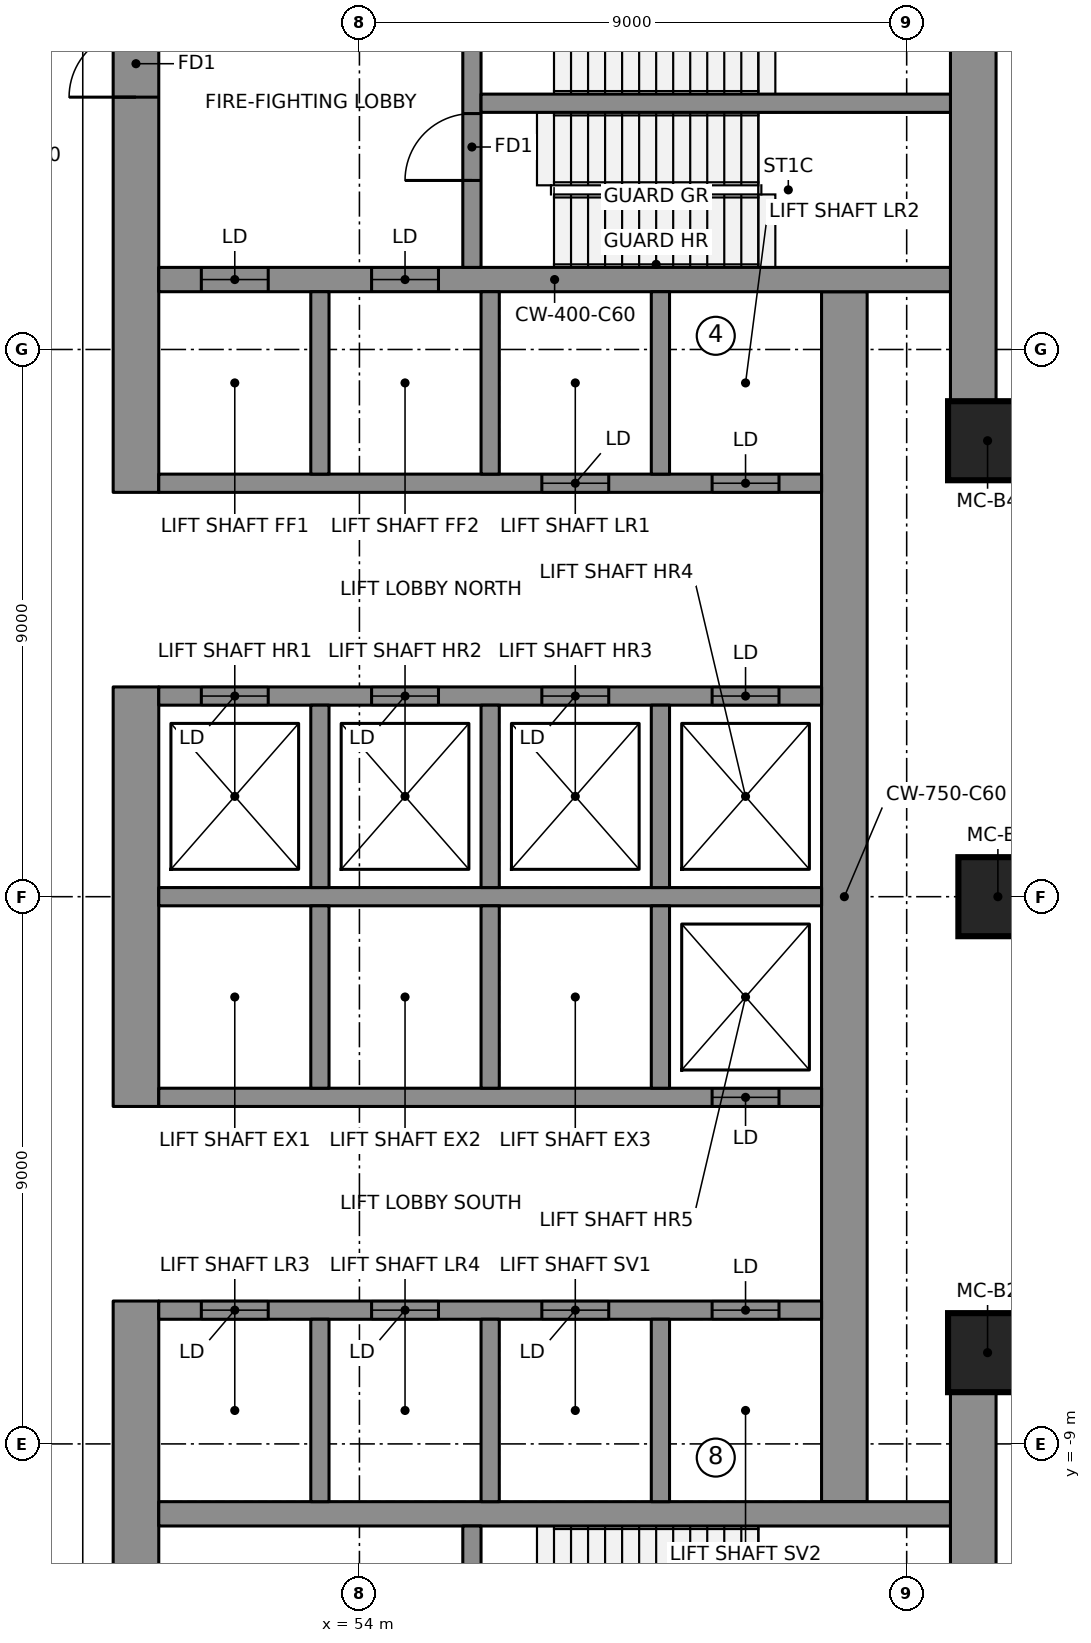
"""IFC4 building model, lengths in metres.
Left out: names, types, materials, properties, quantities, classifications, styles, units other than length and angle.
Written with IfcOpenShell. Run it as: python <this file> out.ifc"""

import sys

from ifc_helpers import new_model, si_unit, direction, frame, frame_2d, origin, origin_2d, place, context, subcontext, project, spatial, rectangle, extrude, element, fill, save


model = new_model("IFC4")
c1 = context("Model", 3, precision=1e-05, world=origin(), true_north=direction((0.0, 1.0)))
c2 = subcontext(c1, "Body", "Model", "MODEL_VIEW")
j1 = project(units=[si_unit("LENGTHUNIT", "METRE"), si_unit("PLANEANGLEUNIT", "RADIAN")], contexts=[c1])
p1 = place(None, origin())
s1 = spatial("IfcSite", under=j1, at=p1, CompositionType="ELEMENT")
p2 = place(p1, origin())
s2 = spatial("IfcBuilding", under=s1, at=p2, CompositionType="ELEMENT")
p3 = place(p2, frame((0.0, 0.0, 170.9)))
s3 = spatial("IfcBuildingStorey", under=s2, at=p3, CompositionType="ELEMENT", Elevation=170.9)
p4 = place(p3, frame((50.325, 6.65, 0.0), z_axis=(0.0, 0.0, 1.0), x_axis=(0.0, 1.0, 0.0)))
e1 = element("IfcWall", 1, at=p4, inside=s3, PredefinedType="SHEAR", context=c2, shape_type="SweptSolid", body=[
    extrude(rectangle(XDim=9.85, YDim=0.75, at=frame_2d((4.925, 0.0))), origin(), (0.0, 0.0, 1.0), 4.6),
])
p5 = place(p4, frame((6.5, 0.0, 0.0)))
e2 = element("IfcOpeningElement", 2, at=p5, cuts=e1, PredefinedType="OPENING", context=c2, shape_type="SweptSolid", body=[
    extrude(rectangle(XDim=1.1, YDim=2.1, at=frame_2d((0.55, 1.05))), frame((0.0, 0.385, 0.0), z_axis=(0.0, -1.0, 0.0), x_axis=(1.0, 0.0, 0.0)), (0.0, 0.0, 1.0), 0.77),
])
p6 = place(p3, frame((50.325, -3.45, 0.0), z_axis=(0.0, 0.0, 1.0), x_axis=(0.0, 1.0, 0.0)))
e3 = element("IfcWall", 3, at=p6, inside=s3, PredefinedType="SHEAR", context=c2, shape_type="SweptSolid", body=[
    extrude(rectangle(XDim=6.9, YDim=0.75, at=frame_2d((3.45, 0.0))), origin(), (0.0, 0.0, 1.0), 4.6),
])
p7 = place(p3, frame((50.325, -16.5, 0.0), z_axis=(0.0, 0.0, 1.0), x_axis=(0.0, 1.0, 0.0)))
e4 = element("IfcWall", 4, at=p7, inside=s3, PredefinedType="SHEAR", context=c2, shape_type="SweptSolid", body=[
    extrude(rectangle(XDim=9.85, YDim=0.75, at=frame_2d((4.925, 0.0))), origin(), (0.0, 0.0, 1.0), 4.6),
])
p8 = place(p7, frame((2.25, 0.0, 0.0)))
e5 = element("IfcOpeningElement", 5, at=p8, cuts=e4, PredefinedType="OPENING", context=c2, shape_type="SweptSolid", body=[
    extrude(rectangle(XDim=1.1, YDim=2.1, at=frame_2d((0.55, 1.05))), frame((0.0, 0.385, 0.0), z_axis=(0.0, -1.0, 0.0), x_axis=(1.0, 0.0, 0.0)), (0.0, 0.0, 1.0), 0.77),
])
for number, where, z_axis, x_axis in (
    (6, (64.095, 8.099, 0.0), (0.0, 0.0, 1.0), (0.0, 1.0, 0.0)),
    (7, (64.095, -15.75, 0.0), (0.0, 0.0, 1.0), (0.0, 1.0, 0.0)),
):
    element("IfcWall", number, at=place(p3, frame(where, z_axis=z_axis, x_axis=x_axis)), inside=s3, PredefinedType="SHEAR", context=c2, shape_type="SweptSolid", body=[
        extrude(rectangle(XDim=7.651, YDim=0.75, at=frame_2d((3.825, 0.0))), origin(), (0.0, 0.0, 1.0), 4.6),
    ])
p9 = place(p3, frame((61.975, -9.95, 0.0), z_axis=(0.0, 0.0, 1.0), x_axis=(0.0, 1.0, 0.0)))
e8 = element("IfcWall", 8, at=p9, inside=s3, PredefinedType="SHEAR", context=c2, shape_type="SweptSolid", body=[
    extrude(rectangle(XDim=19.9, YDim=0.75, at=frame_2d((9.95, 0.0))), origin(), (0.0, 0.0, 1.0), 4.6),
])
p10 = place(p3, frame((50.7, 10.15, 0.0), z_axis=(0.0, 0.0, 1.0), x_axis=(1.0, 0.0, 0.0)))
e9 = element("IfcWall", 9, at=p10, inside=s3, PredefinedType="SHEAR", context=c2, shape_type="SweptSolid", body=[
    extrude(rectangle(XDim=13.02, YDim=0.4, at=frame_2d((6.51, 0.0))), origin(), (0.0, 0.0, 1.0), 4.6),
])
p11 = place(p10, frame((0.7, 0.0, 0.0)))
e10 = element("IfcOpeningElement", 10, at=p11, cuts=e9, PredefinedType="OPENING", context=c2, shape_type="SweptSolid", body=[
    extrude(rectangle(XDim=1.1, YDim=2.1, at=frame_2d((0.55, 1.05))), frame((0.0, 0.21, 0.0), z_axis=(0.0, -1.0, 0.0), x_axis=(1.0, 0.0, 0.0)), (0.0, 0.0, 1.0), 0.42),
])
p12 = place(p10, frame((3.5, 0.0, 0.0)))
e11 = element("IfcOpeningElement", 11, at=p12, cuts=e9, PredefinedType="OPENING", context=c2, shape_type="SweptSolid", body=[
    extrude(rectangle(XDim=1.1, YDim=2.1, at=frame_2d((0.55, 1.05))), frame((0.0, 0.21, 0.0), z_axis=(0.0, -1.0, 0.0), x_axis=(1.0, 0.0, 0.0)), (0.0, 0.0, 1.0), 0.42),
])
p13 = place(p3, frame((50.7, -10.15, 0.0), z_axis=(0.0, 0.0, 1.0), x_axis=(1.0, 0.0, 0.0)))
e12 = element("IfcWall", 12, at=p13, inside=s3, PredefinedType="SHEAR", context=c2, shape_type="SweptSolid", body=[
    extrude(rectangle(XDim=13.02, YDim=0.4, at=frame_2d((6.51, 0.0))), origin(), (0.0, 0.0, 1.0), 4.6),
])
p14 = place(p3, frame((50.7, 0.0, 0.0), z_axis=(0.0, 0.0, 1.0), x_axis=(1.0, 0.0, 0.0)))
e13 = element("IfcWall", 13, at=p14, inside=s3, PredefinedType="SHEAR", context=c2, shape_type="SweptSolid", body=[
    extrude(rectangle(XDim=10.9, YDim=0.3, at=frame_2d((5.45, 0.0))), origin(), (0.0, 0.0, 1.0), 4.6),
])
p15 = place(p3, frame((50.7, 3.3, 0.0), z_axis=(0.0, 0.0, 1.0), x_axis=(1.0, 0.0, 0.0)))
e14 = element("IfcWall", 14, at=p15, inside=s3, PredefinedType="SHEAR", context=c2, shape_type="SweptSolid", body=[
    extrude(rectangle(XDim=10.9, YDim=0.3, at=frame_2d((5.45, 0.0))), origin(), (0.0, 0.0, 1.0), 4.6),
])
p16 = place(p15, frame((0.7, 0.0, 0.0)))
e15 = element("IfcOpeningElement", 15, at=p16, cuts=e14, PredefinedType="OPENING", context=c2, shape_type="SweptSolid", body=[
    extrude(rectangle(XDim=1.1, YDim=2.1, at=frame_2d((0.55, 1.05))), frame((0.0, 0.16, 0.0), z_axis=(0.0, -1.0, 0.0), x_axis=(1.0, 0.0, 0.0)), (0.0, 0.0, 1.0), 0.32),
])
p17 = place(p15, frame((3.5, 0.0, 0.0)))
e16 = element("IfcOpeningElement", 16, at=p17, cuts=e14, PredefinedType="OPENING", context=c2, shape_type="SweptSolid", body=[
    extrude(rectangle(XDim=1.1, YDim=2.1, at=frame_2d((0.55, 1.05))), frame((0.0, 0.16, 0.0), z_axis=(0.0, -1.0, 0.0), x_axis=(1.0, 0.0, 0.0)), (0.0, 0.0, 1.0), 0.32),
])
p18 = place(p15, frame((6.3, 0.0, 0.0)))
e17 = element("IfcOpeningElement", 17, at=p18, cuts=e14, PredefinedType="OPENING", context=c2, shape_type="SweptSolid", body=[
    extrude(rectangle(XDim=1.1, YDim=2.1, at=frame_2d((0.55, 1.05))), frame((0.0, 0.16, 0.0), z_axis=(0.0, -1.0, 0.0), x_axis=(1.0, 0.0, 0.0)), (0.0, 0.0, 1.0), 0.32),
])
p19 = place(p15, frame((9.1, 0.0, 0.0)))
e18 = element("IfcOpeningElement", 18, at=p19, cuts=e14, PredefinedType="OPENING", context=c2, shape_type="SweptSolid", body=[
    extrude(rectangle(XDim=1.1, YDim=2.1, at=frame_2d((0.55, 1.05))), frame((0.0, 0.16, 0.0), z_axis=(0.0, -1.0, 0.0), x_axis=(1.0, 0.0, 0.0)), (0.0, 0.0, 1.0), 0.32),
])
p20 = place(p3, frame((50.7, 6.8, 0.0), z_axis=(0.0, 0.0, 1.0), x_axis=(1.0, 0.0, 0.0)))
e19 = element("IfcWall", 19, at=p20, inside=s3, PredefinedType="SHEAR", context=c2, shape_type="SweptSolid", body=[
    extrude(rectangle(XDim=10.9, YDim=0.3, at=frame_2d((5.45, 0.0))), origin(), (0.0, 0.0, 1.0), 4.6),
])
p21 = place(p20, frame((6.3, 0.0, 0.0)))
e20 = element("IfcOpeningElement", 20, at=p21, cuts=e19, PredefinedType="OPENING", context=c2, shape_type="SweptSolid", body=[
    extrude(rectangle(XDim=1.1, YDim=2.1, at=frame_2d((0.55, 1.05))), frame((0.0, 0.16, 0.0), z_axis=(0.0, -1.0, 0.0), x_axis=(1.0, 0.0, 0.0)), (0.0, 0.0, 1.0), 0.32),
])
p22 = place(p20, frame((9.1, 0.0, 0.0)))
e21 = element("IfcOpeningElement", 21, at=p22, cuts=e19, PredefinedType="OPENING", context=c2, shape_type="SweptSolid", body=[
    extrude(rectangle(XDim=1.1, YDim=2.1, at=frame_2d((0.55, 1.05))), frame((0.0, 0.16, 0.0), z_axis=(0.0, -1.0, 0.0), x_axis=(1.0, 0.0, 0.0)), (0.0, 0.0, 1.0), 0.32),
])
for number, where, z_axis, x_axis in (
    (22, (53.35, 0.15, 0.0), (0.0, 0.0, 1.0), (0.0, 1.0, 0.0)),
    (23, (53.35, 6.95, 0.0), (0.0, 0.0, 1.0), (0.0, 1.0, 0.0)),
    (24, (56.15, 0.15, 0.0), (0.0, 0.0, 1.0), (0.0, 1.0, 0.0)),
    (25, (56.15, 6.95, 0.0), (0.0, 0.0, 1.0), (0.0, 1.0, 0.0)),
    (26, (58.95, 0.15, 0.0), (0.0, 0.0, 1.0), (0.0, 1.0, 0.0)),
    (27, (58.95, 6.95, 0.0), (0.0, 0.0, 1.0), (0.0, 1.0, 0.0)),
):
    element("IfcWall", number, at=place(p3, frame(where, z_axis=z_axis, x_axis=x_axis)), inside=s3, PredefinedType="SHEAR", context=c2, shape_type="SweptSolid", body=[
        extrude(rectangle(XDim=3.0, YDim=0.3, at=frame_2d((1.5, 0.0))), origin(), (0.0, 0.0, 1.0), 4.6),
    ])
p23 = place(p3, frame((50.7, -3.3, 0.0), z_axis=(0.0, 0.0, 1.0), x_axis=(1.0, 0.0, 0.0)))
e28 = element("IfcWall", 28, at=p23, inside=s3, PredefinedType="SHEAR", context=c2, shape_type="SweptSolid", body=[
    extrude(rectangle(XDim=10.9, YDim=0.3, at=frame_2d((5.45, 0.0))), origin(), (0.0, 0.0, 1.0), 4.6),
])
p24 = place(p23, frame((9.1, 0.0, 0.0)))
e29 = element("IfcOpeningElement", 29, at=p24, cuts=e28, PredefinedType="OPENING", context=c2, shape_type="SweptSolid", body=[
    extrude(rectangle(XDim=1.1, YDim=2.1, at=frame_2d((0.55, 1.05))), frame((0.0, 0.16, 0.0), z_axis=(0.0, -1.0, 0.0), x_axis=(1.0, 0.0, 0.0)), (0.0, 0.0, 1.0), 0.32),
])
p25 = place(p3, frame((50.7, -6.8, 0.0), z_axis=(0.0, 0.0, 1.0), x_axis=(1.0, 0.0, 0.0)))
e30 = element("IfcWall", 30, at=p25, inside=s3, PredefinedType="SHEAR", context=c2, shape_type="SweptSolid", body=[
    extrude(rectangle(XDim=10.9, YDim=0.3, at=frame_2d((5.45, 0.0))), origin(), (0.0, 0.0, 1.0), 4.6),
])
p26 = place(p25, frame((0.7, 0.0, 0.0)))
e31 = element("IfcOpeningElement", 31, at=p26, cuts=e30, PredefinedType="OPENING", context=c2, shape_type="SweptSolid", body=[
    extrude(rectangle(XDim=1.1, YDim=2.1, at=frame_2d((0.55, 1.05))), frame((0.0, 0.16, 0.0), z_axis=(0.0, -1.0, 0.0), x_axis=(1.0, 0.0, 0.0)), (0.0, 0.0, 1.0), 0.32),
])
p27 = place(p25, frame((3.5, 0.0, 0.0)))
e32 = element("IfcOpeningElement", 32, at=p27, cuts=e30, PredefinedType="OPENING", context=c2, shape_type="SweptSolid", body=[
    extrude(rectangle(XDim=1.1, YDim=2.1, at=frame_2d((0.55, 1.05))), frame((0.0, 0.16, 0.0), z_axis=(0.0, -1.0, 0.0), x_axis=(1.0, 0.0, 0.0)), (0.0, 0.0, 1.0), 0.32),
])
p28 = place(p25, frame((6.3, 0.0, 0.0)))
e33 = element("IfcOpeningElement", 33, at=p28, cuts=e30, PredefinedType="OPENING", context=c2, shape_type="SweptSolid", body=[
    extrude(rectangle(XDim=1.1, YDim=2.1, at=frame_2d((0.55, 1.05))), frame((0.0, 0.16, 0.0), z_axis=(0.0, -1.0, 0.0), x_axis=(1.0, 0.0, 0.0)), (0.0, 0.0, 1.0), 0.32),
])
p29 = place(p25, frame((9.1, 0.0, 0.0)))
e34 = element("IfcOpeningElement", 34, at=p29, cuts=e30, PredefinedType="OPENING", context=c2, shape_type="SweptSolid", body=[
    extrude(rectangle(XDim=1.1, YDim=2.1, at=frame_2d((0.55, 1.05))), frame((0.0, 0.16, 0.0), z_axis=(0.0, -1.0, 0.0), x_axis=(1.0, 0.0, 0.0)), (0.0, 0.0, 1.0), 0.32),
])
for number, where, z_axis, x_axis in (
    (35, (53.35, -3.15, 0.0), (0.0, 0.0, 1.0), (0.0, 1.0, 0.0)),
    (36, (53.35, -9.95, 0.0), (0.0, 0.0, 1.0), (0.0, 1.0, 0.0)),
    (37, (56.15, -3.15, 0.0), (0.0, 0.0, 1.0), (0.0, 1.0, 0.0)),
    (38, (56.15, -9.95, 0.0), (0.0, 0.0, 1.0), (0.0, 1.0, 0.0)),
    (39, (58.95, -3.15, 0.0), (0.0, 0.0, 1.0), (0.0, 1.0, 0.0)),
    (40, (58.95, -9.95, 0.0), (0.0, 0.0, 1.0), (0.0, 1.0, 0.0)),
):
    element("IfcWall", number, at=place(p3, frame(where, z_axis=z_axis, x_axis=x_axis)), inside=s3, PredefinedType="SHEAR", context=c2, shape_type="SweptSolid", body=[
        extrude(rectangle(XDim=3.0, YDim=0.3, at=frame_2d((1.5, 0.0))), origin(), (0.0, 0.0, 1.0), 4.6),
    ])
p30 = place(p3, frame((55.85, 10.35, 0.0), z_axis=(0.0, 0.0, 1.0), x_axis=(0.0, 1.0, 0.0)))
e41 = element("IfcWall", 41, at=p30, inside=s3, PredefinedType="SHEAR", context=c2, shape_type="SweptSolid", body=[
    extrude(rectangle(XDim=5.4, YDim=0.3, at=frame_2d((2.7, 0.0))), origin(), (0.0, 0.0, 1.0), 4.6),
])
p31 = place(p30, frame((1.43, 0.0, 0.0)))
e42 = element("IfcOpeningElement", 42, at=p31, cuts=e41, PredefinedType="OPENING", context=c2, shape_type="SweptSolid", body=[
    extrude(rectangle(XDim=1.1, YDim=2.1, at=frame_2d((0.55, 1.05))), frame((0.0, 0.16, 0.0), z_axis=(0.0, -1.0, 0.0), x_axis=(1.0, 0.0, 0.0)), (0.0, 0.0, 1.0), 0.32),
])
p32 = place(p30, frame((3.6, 0.0, 0.0)))
e43 = element("IfcOpeningElement", 43, at=p32, cuts=e41, PredefinedType="OPENING", context=c2, shape_type="SweptSolid", body=[
    extrude(rectangle(XDim=1.1, YDim=2.1, at=frame_2d((0.55, 1.05))), frame((0.0, 0.16, 0.0), z_axis=(0.0, -1.0, 0.0), x_axis=(1.0, 0.0, 0.0)), (0.0, 0.0, 1.0), 0.32),
])
p33 = place(p3, frame((55.85, -15.75, 0.0), z_axis=(0.0, 0.0, 1.0), x_axis=(0.0, 1.0, 0.0)))
e44 = element("IfcWall", 44, at=p33, inside=s3, PredefinedType="SHEAR", context=c2, shape_type="SweptSolid", body=[
    extrude(rectangle(XDim=5.4, YDim=0.3, at=frame_2d((2.7, 0.0))), origin(), (0.0, 0.0, 1.0), 4.6),
])
p34 = place(p33, frame((3.6, 0.0, 0.0)))
e45 = element("IfcOpeningElement", 45, at=p34, cuts=e44, PredefinedType="OPENING", context=c2, shape_type="SweptSolid", body=[
    extrude(rectangle(XDim=1.1, YDim=2.1, at=frame_2d((0.55, 1.05))), frame((0.0, 0.16, 0.0), z_axis=(0.0, -1.0, 0.0), x_axis=(1.0, 0.0, 0.0)), (0.0, 0.0, 1.0), 0.32),
])
p35 = place(p33, frame((0.8, 0.0, 0.0)))
e46 = element("IfcOpeningElement", 46, at=p35, cuts=e44, PredefinedType="OPENING", context=c2, shape_type="SweptSolid", body=[
    extrude(rectangle(XDim=0.9, YDim=2.1, at=frame_2d((0.45, 1.05))), frame((0.0, 0.16, 0.0), z_axis=(0.0, -1.0, 0.0), x_axis=(1.0, 0.0, 0.0)), (0.0, 0.0, 1.0), 0.32),
])
p36 = place(p3, frame((56.0, 13.05, 0.0), z_axis=(0.0, 0.0, 1.0), x_axis=(1.0, 0.0, 0.0)))
e47 = element("IfcWall", 47, at=p36, inside=s3, PredefinedType="SHEAR", context=c2, shape_type="SweptSolid", body=[
    extrude(rectangle(XDim=7.72, YDim=0.3, at=frame_2d((3.86, 0.0))), origin(), (0.0, 0.0, 1.0), 4.6),
])
for number, where, z_axis, x_axis in (
    (48, (64.33, -7.499, 0.0), (0.0, 0.0, 1.0), (1.0, 0.0, 0.0)),
    (49, (64.5, 0.0, 0.0), (0.0, 0.0, 1.0), (1.0, 0.0, 0.0)),
    (50, (64.33, 7.499, 0.0), (0.0, 0.0, 1.0), (1.0, 0.0, 0.0)),
):
    element("IfcColumn", number, at=place(p3, frame(where, z_axis=z_axis, x_axis=x_axis)), inside=s3, PredefinedType="COLUMN", context=c2, shape_type="SweptSolid", body=[
        extrude(rectangle(XDim=1.3, YDim=1.3, at=origin_2d()), origin(), (0.0, 0.0, 1.0), 4.6),
    ])
p37 = place(p11, origin())
e51 = element("IfcDoor", 51, at=p37, inside=s3, OperationType="DOUBLE_DOOR_SLIDING", PredefinedType="DOOR", context=c2, shape_type="SweptSolid", body=[
    extrude(rectangle(XDim=1.1, YDim=2.1, at=frame_2d((0.55, 1.05))), frame((0.0, 0.025, 0.0), z_axis=(0.0, -1.0, 0.0), x_axis=(1.0, 0.0, 0.0)), (0.0, 0.0, 1.0), 0.05),
])
fill(e10, e51)
p38 = place(p12, origin())
e52 = element("IfcDoor", 52, at=p38, inside=s3, OperationType="DOUBLE_DOOR_SLIDING", PredefinedType="DOOR", context=c2, shape_type="SweptSolid", body=[
    extrude(rectangle(XDim=1.1, YDim=2.1, at=frame_2d((0.55, 1.05))), frame((0.0, 0.025, 0.0), z_axis=(0.0, -1.0, 0.0), x_axis=(1.0, 0.0, 0.0)), (0.0, 0.0, 1.0), 0.05),
])
fill(e11, e52)
p39 = place(p21, origin())
e53 = element("IfcDoor", 53, at=p39, inside=s3, OperationType="DOUBLE_DOOR_SLIDING", PredefinedType="DOOR", context=c2, shape_type="SweptSolid", body=[
    extrude(rectangle(XDim=1.1, YDim=2.1, at=frame_2d((0.55, 1.05))), frame((0.0, 0.025, 0.0), z_axis=(0.0, -1.0, 0.0), x_axis=(1.0, 0.0, 0.0)), (0.0, 0.0, 1.0), 0.05),
])
fill(e20, e53)
p40 = place(p22, origin())
e54 = element("IfcDoor", 54, at=p40, inside=s3, OperationType="DOUBLE_DOOR_SLIDING", PredefinedType="DOOR", context=c2, shape_type="SweptSolid", body=[
    extrude(rectangle(XDim=1.1, YDim=2.1, at=frame_2d((0.55, 1.05))), frame((0.0, 0.025, 0.0), z_axis=(0.0, -1.0, 0.0), x_axis=(1.0, 0.0, 0.0)), (0.0, 0.0, 1.0), 0.05),
])
fill(e21, e54)
p41 = place(p16, origin())
e55 = element("IfcDoor", 55, at=p41, inside=s3, OperationType="DOUBLE_DOOR_SLIDING", PredefinedType="DOOR", context=c2, shape_type="SweptSolid", body=[
    extrude(rectangle(XDim=1.1, YDim=2.1, at=frame_2d((0.55, 1.05))), frame((0.0, 0.025, 0.0), z_axis=(0.0, -1.0, 0.0), x_axis=(1.0, 0.0, 0.0)), (0.0, 0.0, 1.0), 0.05),
])
fill(e15, e55)
p42 = place(p17, origin())
e56 = element("IfcDoor", 56, at=p42, inside=s3, OperationType="DOUBLE_DOOR_SLIDING", PredefinedType="DOOR", context=c2, shape_type="SweptSolid", body=[
    extrude(rectangle(XDim=1.1, YDim=2.1, at=frame_2d((0.55, 1.05))), frame((0.0, 0.025, 0.0), z_axis=(0.0, -1.0, 0.0), x_axis=(1.0, 0.0, 0.0)), (0.0, 0.0, 1.0), 0.05),
])
fill(e16, e56)
p43 = place(p18, origin())
e57 = element("IfcDoor", 57, at=p43, inside=s3, OperationType="DOUBLE_DOOR_SLIDING", PredefinedType="DOOR", context=c2, shape_type="SweptSolid", body=[
    extrude(rectangle(XDim=1.1, YDim=2.1, at=frame_2d((0.55, 1.05))), frame((0.0, 0.025, 0.0), z_axis=(0.0, -1.0, 0.0), x_axis=(1.0, 0.0, 0.0)), (0.0, 0.0, 1.0), 0.05),
])
fill(e17, e57)
p44 = place(p19, origin())
e58 = element("IfcDoor", 58, at=p44, inside=s3, OperationType="DOUBLE_DOOR_SLIDING", PredefinedType="DOOR", context=c2, shape_type="SweptSolid", body=[
    extrude(rectangle(XDim=1.1, YDim=2.1, at=frame_2d((0.55, 1.05))), frame((0.0, 0.025, 0.0), z_axis=(0.0, -1.0, 0.0), x_axis=(1.0, 0.0, 0.0)), (0.0, 0.0, 1.0), 0.05),
])
fill(e18, e58)
p45 = place(p24, origin())
e59 = element("IfcDoor", 59, at=p45, inside=s3, OperationType="DOUBLE_DOOR_SLIDING", PredefinedType="DOOR", context=c2, shape_type="SweptSolid", body=[
    extrude(rectangle(XDim=1.1, YDim=2.1, at=frame_2d((0.55, 1.05))), frame((0.0, 0.025, 0.0), z_axis=(0.0, -1.0, 0.0), x_axis=(1.0, 0.0, 0.0)), (0.0, 0.0, 1.0), 0.05),
])
fill(e29, e59)
p46 = place(p26, origin())
e60 = element("IfcDoor", 60, at=p46, inside=s3, OperationType="DOUBLE_DOOR_SLIDING", PredefinedType="DOOR", context=c2, shape_type="SweptSolid", body=[
    extrude(rectangle(XDim=1.1, YDim=2.1, at=frame_2d((0.55, 1.05))), frame((0.0, 0.025, 0.0), z_axis=(0.0, -1.0, 0.0), x_axis=(1.0, 0.0, 0.0)), (0.0, 0.0, 1.0), 0.05),
])
fill(e31, e60)
p47 = place(p27, origin())
e61 = element("IfcDoor", 61, at=p47, inside=s3, OperationType="DOUBLE_DOOR_SLIDING", PredefinedType="DOOR", context=c2, shape_type="SweptSolid", body=[
    extrude(rectangle(XDim=1.1, YDim=2.1, at=frame_2d((0.55, 1.05))), frame((0.0, 0.025, 0.0), z_axis=(0.0, -1.0, 0.0), x_axis=(1.0, 0.0, 0.0)), (0.0, 0.0, 1.0), 0.05),
])
fill(e32, e61)
p48 = place(p28, origin())
e62 = element("IfcDoor", 62, at=p48, inside=s3, OperationType="DOUBLE_DOOR_SLIDING", PredefinedType="DOOR", context=c2, shape_type="SweptSolid", body=[
    extrude(rectangle(XDim=1.1, YDim=2.1, at=frame_2d((0.55, 1.05))), frame((0.0, 0.025, 0.0), z_axis=(0.0, -1.0, 0.0), x_axis=(1.0, 0.0, 0.0)), (0.0, 0.0, 1.0), 0.05),
])
fill(e33, e62)
p49 = place(p29, origin())
e63 = element("IfcDoor", 63, at=p49, inside=s3, OperationType="DOUBLE_DOOR_SLIDING", PredefinedType="DOOR", context=c2, shape_type="SweptSolid", body=[
    extrude(rectangle(XDim=1.1, YDim=2.1, at=frame_2d((0.55, 1.05))), frame((0.0, 0.025, 0.0), z_axis=(0.0, -1.0, 0.0), x_axis=(1.0, 0.0, 0.0)), (0.0, 0.0, 1.0), 0.05),
])
fill(e34, e63)
p50 = place(p31, origin())
e64 = element("IfcDoor", 64, at=p50, inside=s3, OperationType="SINGLE_SWING_RIGHT", PredefinedType="DOOR", context=c2, shape_type="SweptSolid", body=[
    extrude(rectangle(XDim=1.1, YDim=2.1, at=frame_2d((0.55, 1.05))), frame((0.0, 0.025, 0.0), z_axis=(0.0, -1.0, 0.0), x_axis=(1.0, 0.0, 0.0)), (0.0, 0.0, 1.0), 0.05),
])
fill(e42, e64)
p51 = place(p5, origin())
e65 = element("IfcDoor", 65, at=p51, inside=s3, OperationType="SINGLE_SWING_RIGHT", PredefinedType="DOOR", context=c2, shape_type="SweptSolid", body=[
    extrude(rectangle(XDim=1.1, YDim=2.1, at=frame_2d((0.55, 1.05))), frame((0.0, 0.025, 0.0), z_axis=(0.0, -1.0, 0.0), x_axis=(1.0, 0.0, 0.0)), (0.0, 0.0, 1.0), 0.05),
])
fill(e2, e65)
save(model, sys.argv[1])
